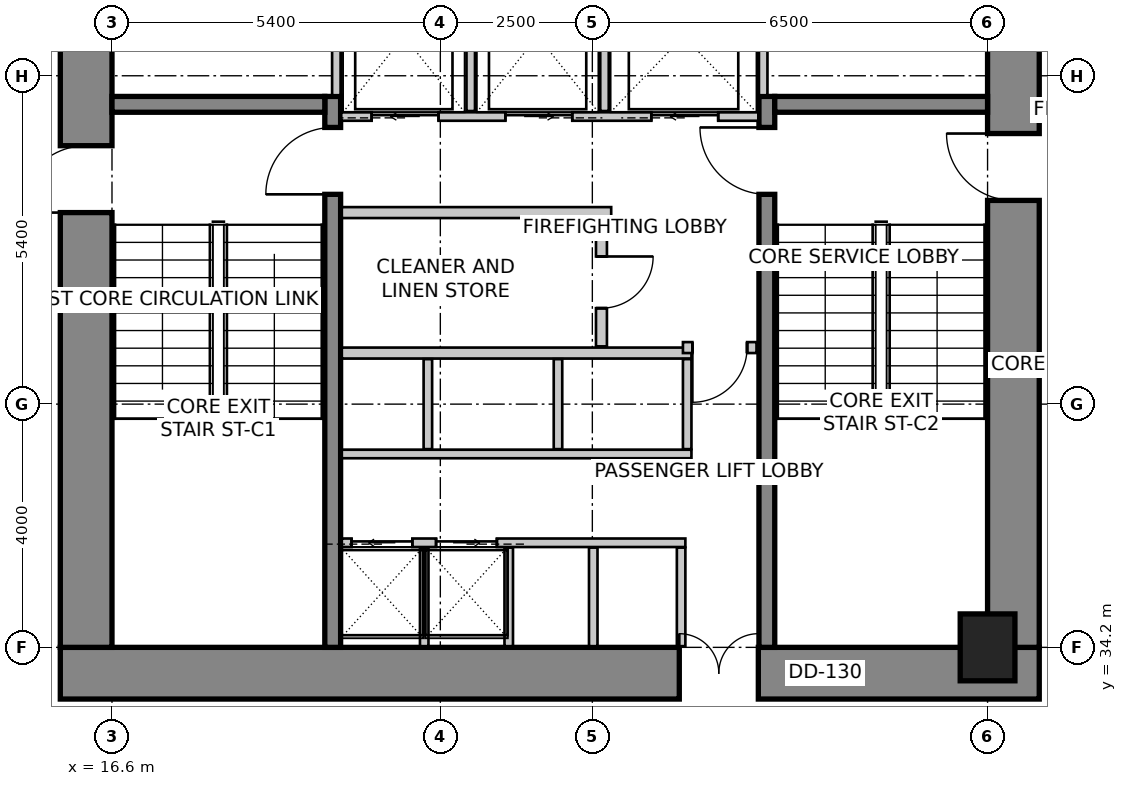
"""IFC4 building model, lengths in metres.
Left out: names, types, materials, properties, quantities, classifications, styles, units other than length and angle.
Written with IfcOpenShell. Run it as: python <this file> out.ifc"""

import sys

from ifc_helpers import new_model, si_unit, direction, frame, frame_2d, origin, origin_2d, place, context, subcontext, project, spatial, rectangle, extrude, source, transform, mapped, element, fill, save


model = new_model("IFC4")
c1 = context("Model", 3, precision=1e-05, world=origin(), true_north=direction((0.0, 1.0)))
c2 = subcontext(c1, "Body", "Model", "MODEL_VIEW")
j1 = project(units=[si_unit("LENGTHUNIT", "METRE"), si_unit("PLANEANGLEUNIT", "RADIAN")], contexts=[c1])
p1 = place(None, origin())
s1 = spatial("IfcSite", under=j1, at=p1, CompositionType="ELEMENT")
p2 = place(p1, origin())
s2 = spatial("IfcBuilding", under=s1, at=p2, CompositionType="ELEMENT")
p3 = place(p2, frame((0.0, 0.0, 91.0)))
s3 = spatial("IfcBuildingStorey", under=s2, at=p3, CompositionType="ELEMENT", Elevation=91.0)
p4 = place(p3, frame((15.75, 33.775, 0.0), z_axis=(0.0, 0.0, 1.0), x_axis=(1.0, 0.0, 0.0)))
e1 = element("IfcWall", 1, at=p4, inside=s3, PredefinedType="SHEAR", context=c2, shape_type="SweptSolid", body=[
    extrude(rectangle(XDim=16.1, YDim=0.85, at=frame_2d((8.05, 0.0))), origin(), (0.0, 0.0, 1.0), 4.0),
])
m1 = source(origin(), c2, "Body", "SweptSolid", [
    extrude(rectangle(XDim=1.3, YDim=2.15, at=frame_2d((0.65, 1.075))), frame((0.0, 0.435, 0.0), z_axis=(0.0, -1.0, 0.0), x_axis=(1.0, 0.0, 0.0)), (0.0, 0.0, 1.0), 0.87),
])
p5 = place(p4, frame((10.18, 0.0, 0.0)))
e2 = element("IfcOpeningElement", 2, at=p5, cuts=e1, PredefinedType="OPENING", context=c2, shape_type="MappedRepresentation", body=[
    mapped(m1, transform((0.0, 0.0, 0.0), scale=1.0)),
])
p6 = place(p3, frame((16.175, 34.2, 0.0), z_axis=(0.0, 0.0, 1.0), x_axis=(0.0, 1.0, 0.0)))
e3 = element("IfcWall", 3, at=p6, inside=s3, PredefinedType="SHEAR", context=c2, shape_type="SweptSolid", body=[
    extrude(rectangle(XDim=11.4, YDim=0.85, at=frame_2d((5.7, 0.0))), origin(), (0.0, 0.0, 1.0), 4.0),
])
m2 = source(origin(), c2, "Body", "SweptSolid", [
    extrude(rectangle(XDim=1.1, YDim=2.15, at=frame_2d((0.55, 1.075))), frame((0.0, 0.435, 0.0), z_axis=(0.0, -1.0, 0.0), x_axis=(1.0, 0.0, 0.0)), (0.0, 0.0, 1.0), 0.87),
])
p7 = place(p6, frame((7.15, 0.0, 0.0)))
e4 = element("IfcOpeningElement", 4, at=p7, cuts=e3, PredefinedType="OPENING", context=c2, shape_type="MappedRepresentation", body=[
    mapped(m2, transform((0.0, 0.0, 0.0), scale=1.0)),
])
p8 = place(p3, frame((31.425, 34.2, 0.0), z_axis=(0.0, 0.0, 1.0), x_axis=(0.0, 1.0, 0.0)))
e5 = element("IfcWall", 5, at=p8, inside=s3, PredefinedType="SHEAR", context=c2, shape_type="SweptSolid", body=[
    extrude(rectangle(XDim=11.4, YDim=0.85, at=frame_2d((5.7, 0.0))), origin(), (0.0, 0.0, 1.0), 4.0),
])
p9 = place(p8, frame((7.35, 0.0, 0.0)))
e6 = element("IfcOpeningElement", 6, at=p9, cuts=e5, PredefinedType="OPENING", context=c2, shape_type="MappedRepresentation", body=[
    mapped(m2, transform((0.0, 0.0, 0.0), scale=1.0)),
])
p10 = place(p3, frame((20.23, 34.2, 0.0), z_axis=(0.0, 0.0, 1.0), x_axis=(0.0, 1.0, 0.0)))
e7 = element("IfcWall", 7, at=p10, inside=s3, PredefinedType="SHEAR", context=c2, shape_type="SweptSolid", body=[
    extrude(rectangle(XDim=9.06, YDim=0.26, at=frame_2d((4.53, 0.0))), origin(), (0.0, 0.0, 1.0), 4.0),
])
m3 = source(origin(), c2, "Body", "SweptSolid", [
    extrude(rectangle(XDim=1.1, YDim=2.15, at=frame_2d((0.55, 1.075))), frame((0.0, 0.14, 0.0), z_axis=(0.0, -1.0, 0.0), x_axis=(1.0, 0.0, 0.0)), (0.0, 0.0, 1.0), 0.28),
])
p11 = place(p10, frame((7.45, 0.0, 0.0)))
e8 = element("IfcOpeningElement", 8, at=p11, cuts=e7, PredefinedType="OPENING", context=c2, shape_type="MappedRepresentation", body=[
    mapped(m3, transform((0.0, 0.0, 0.0), scale=1.0)),
])
p12 = place(p3, frame((27.37, 34.2, 0.0), z_axis=(0.0, 0.0, 1.0), x_axis=(0.0, 1.0, 0.0)))
e9 = element("IfcWall", 9, at=p12, inside=s3, PredefinedType="SHEAR", context=c2, shape_type="SweptSolid", body=[
    extrude(rectangle(XDim=9.06, YDim=0.26, at=frame_2d((4.53, 0.0))), origin(), (0.0, 0.0, 1.0), 4.0),
])
p13 = place(p12, frame((7.45, 0.0, 0.0)))
e10 = element("IfcOpeningElement", 10, at=p13, cuts=e9, PredefinedType="OPENING", context=c2, shape_type="MappedRepresentation", body=[
    mapped(m3, transform((0.0, 0.0, 0.0), scale=1.0)),
])
for number, where, z_axis, x_axis in (
    (11, (16.6, 43.13, 0.0), (0.0, 0.0, 1.0), (1.0, 0.0, 0.0)),
    (12, (27.5, 43.13, 0.0), (0.0, 0.0, 1.0), (1.0, 0.0, 0.0)),
):
    element("IfcWall", number, at=place(p3, frame(where, z_axis=z_axis, x_axis=x_axis)), inside=s3, PredefinedType="SHEAR", context=c2, shape_type="SweptSolid", body=[
        extrude(rectangle(XDim=3.5, YDim=0.26, at=frame_2d((1.75, 0.0))), origin(), (0.0, 0.0, 1.0), 4.0),
    ])
m4 = source(origin(), c2, "Body", "SweptSolid", [
    extrude(rectangle(XDim=0.9, YDim=1.1, at=origin_2d()), origin(), (0.0, 0.0, 1.0), 4.0),
])
p14 = place(p3, frame((31.0, 34.2, 0.0), z_axis=(0.0, 0.0, 1.0), x_axis=(1.0, 0.0, 0.0)))
e13 = element("IfcColumn", 13, at=p14, inside=s3, PredefinedType="COLUMN", context=c2, shape_type="MappedRepresentation", body=[
    mapped(m4, transform((0.0, 0.0, 0.0), scale=1.0)),
])
p15 = place(p3, frame((20.37, 42.93, 0.0), z_axis=(0.0, 0.0, 1.0), x_axis=(1.0, 0.0, 0.0)))
e14 = element("IfcWall", 14, at=p15, inside=s3, PredefinedType="SOLIDWALL", context=c2, shape_type="SweptSolid", body=[
    extrude(rectangle(XDim=6.86, YDim=0.14, at=frame_2d((3.43, 0.0))), origin(), (0.0, 0.0, 1.0), 3.75),
])
m5 = source(origin(), c2, "Body", "SweptSolid", [
    extrude(rectangle(XDim=1.1, YDim=2.15, at=frame_2d((0.55, 1.075))), frame((0.0, 0.08, 0.0), z_axis=(0.0, -1.0, 0.0), x_axis=(1.0, 0.0, 0.0)), (0.0, 0.0, 1.0), 0.16),
])
p16 = place(p15, frame((0.5, 0.0, 0.0)))
e15 = element("IfcOpeningElement", 15, at=p16, cuts=e14, PredefinedType="OPENING", context=c2, shape_type="MappedRepresentation", body=[
    mapped(m5, transform((0.0, 0.0, 0.0), scale=1.0)),
])
p17 = place(p15, frame((2.7, 0.0, 0.0)))
e16 = element("IfcOpeningElement", 16, at=p17, cuts=e14, PredefinedType="OPENING", context=c2, shape_type="MappedRepresentation", body=[
    mapped(m5, transform((0.0, 0.0, 0.0), scale=1.0)),
])
p18 = place(p15, frame((5.1, 0.0, 0.0)))
e17 = element("IfcOpeningElement", 17, at=p18, cuts=e14, PredefinedType="OPENING", context=c2, shape_type="MappedRepresentation", body=[
    mapped(m5, transform((0.0, 0.0, 0.0), scale=1.0)),
])
for number, where, z_axis, x_axis in (
    (18, (20.29, 43.28, 0.0), (0.0, 0.0, 1.0), (0.0, 1.0, 0.0)),
    (19, (27.31, 43.28, 0.0), (0.0, 0.0, 1.0), (0.0, 1.0, 0.0)),
):
    element("IfcWall", number, at=place(p3, frame(where, z_axis=z_axis, x_axis=x_axis)), inside=s3, PredefinedType="SOLIDWALL", context=c2, shape_type="SweptSolid", body=[
        extrude(rectangle(XDim=2.3, YDim=0.14, at=frame_2d((1.15, 0.0))), origin(), (0.0, 0.0, 1.0), 3.75),
    ])
for number, where, z_axis, x_axis in (
    (20, (22.5, 43.02, 0.0), (0.0, 0.0, 1.0), (0.0, 1.0, 0.0)),
    (21, (24.7, 43.02, 0.0), (0.0, 0.0, 1.0), (0.0, 1.0, 0.0)),
):
    element("IfcWall", number, at=place(p3, frame(where, z_axis=z_axis, x_axis=x_axis)), inside=s3, PredefinedType="SOLIDWALL", context=c2, shape_type="SweptSolid", body=[
        extrude(rectangle(XDim=2.56, YDim=0.14, at=frame_2d((1.28, 0.0))), origin(), (0.0, 0.0, 1.0), 3.75),
    ])
p19 = place(p3, frame((20.38, 35.92, 0.0), z_axis=(0.0, 0.0, 1.0), x_axis=(1.0, 0.0, 0.0)))
e22 = element("IfcWall", 22, at=p19, inside=s3, PredefinedType="SOLIDWALL", context=c2, shape_type="SweptSolid", body=[
    extrude(rectangle(XDim=5.65, YDim=0.14, at=frame_2d((2.825, 0.0))), origin(), (0.0, 0.0, 1.0), 3.75),
])
m6 = source(origin(), c2, "Body", "SweptSolid", [
    extrude(rectangle(XDim=1.0, YDim=2.15, at=frame_2d((0.5, 1.075))), frame((0.0, 0.08, 0.0), z_axis=(0.0, -1.0, 0.0), x_axis=(1.0, 0.0, 0.0)), (0.0, 0.0, 1.0), 0.16),
])
p20 = place(p19, frame((0.16, 0.0, 0.0)))
e23 = element("IfcOpeningElement", 23, at=p20, cuts=e22, PredefinedType="OPENING", context=c2, shape_type="MappedRepresentation", body=[
    mapped(m6, transform((0.0, 0.0, 0.0), scale=1.0)),
])
p21 = place(p19, frame((1.55, 0.0, 0.0)))
e24 = element("IfcOpeningElement", 24, at=p21, cuts=e22, PredefinedType="OPENING", context=c2, shape_type="MappedRepresentation", body=[
    mapped(m6, transform((0.0, 0.0, 0.0), scale=1.0)),
])
for number, where, z_axis, x_axis in (
    (25, (25.96, 34.22, 0.0), (0.0, 0.0, 1.0), (0.0, 1.0, 0.0)),
    (26, (21.735, 34.22, 0.0), (0.0, 0.0, 1.0), (0.0, 1.0, 0.0)),
    (27, (23.125, 34.22, 0.0), (0.0, 0.0, 1.0), (0.0, 1.0, 0.0)),
    (28, (24.515, 34.22, 0.0), (0.0, 0.0, 1.0), (0.0, 1.0, 0.0)),
):
    element("IfcWall", number, at=place(p3, frame(where, z_axis=z_axis, x_axis=x_axis)), inside=s3, PredefinedType="SOLIDWALL", context=c2, shape_type="SweptSolid", body=[
        extrude(rectangle(XDim=1.62, YDim=0.14, at=frame_2d((0.81, 0.0))), origin(), (0.0, 0.0, 1.0), 3.042),
    ])
p22 = place(p3, frame((20.38, 37.38, 0.0), z_axis=(0.0, 0.0, 1.0), x_axis=(1.0, 0.0, 0.0)))
e29 = element("IfcWall", 29, at=p22, inside=s3, PredefinedType="SOLIDWALL", context=c2, shape_type="SweptSolid", body=[
    extrude(rectangle(XDim=5.75, YDim=0.14, at=frame_2d((2.875, 0.0))), origin(), (0.0, 0.0, 1.0), 3.75),
])
p23 = place(p3, frame((20.38, 39.04, 0.0), z_axis=(0.0, 0.0, 1.0), x_axis=(1.0, 0.0, 0.0)))
e30 = element("IfcWall", 30, at=p23, inside=s3, PredefinedType="SOLIDWALL", context=c2, shape_type="SweptSolid", body=[
    extrude(rectangle(XDim=5.75, YDim=0.18, at=frame_2d((2.875, 0.0))), origin(), (0.0, 0.0, 1.0), 3.75),
])
for number, where, z_axis, x_axis in (
    (31, (26.06, 37.46, 0.0), (0.0, 0.0, 1.0), (0.0, 1.0, 0.0)),
    (32, (21.795, 37.46, 0.0), (0.0, 0.0, 1.0), (0.0, 1.0, 0.0)),
    (33, (23.935, 37.46, 0.0), (0.0, 0.0, 1.0), (0.0, 1.0, 0.0)),
):
    element("IfcWall", number, at=place(p3, frame(where, z_axis=z_axis, x_axis=x_axis)), inside=s3, PredefinedType="SOLIDWALL", context=c2, shape_type="SweptSolid", body=[
        extrude(rectangle(XDim=1.48, YDim=0.14, at=frame_2d((0.74, 0.0))), origin(), (0.0, 0.0, 1.0), 3.75),
    ])
p24 = place(p3, frame((24.81, 41.35, 0.0), z_axis=(0.0, 0.0, 1.0), x_axis=(-1.0, 0.0, 0.0)))
e34 = element("IfcWall", 34, at=p24, inside=s3, PredefinedType="PARTITIONING", context=c2, shape_type="SweptSolid", body=[
    extrude(rectangle(XDim=4.43, YDim=0.18, at=frame_2d((2.215, 0.0))), origin(), (0.0, 0.0, 1.0), 3.75),
])
p25 = place(p3, frame((24.65, 41.256, 0.0), z_axis=(0.0, 0.0, 1.0), x_axis=(0.0, -1.0, 0.0)))
e35 = element("IfcWall", 35, at=p25, inside=s3, PredefinedType="PARTITIONING", context=c2, shape_type="SweptSolid", body=[
    extrude(rectangle(XDim=2.106, YDim=0.18, at=frame_2d((1.053, 0.0))), origin(), (0.0, 0.0, 1.0), 3.75),
])
m7 = source(origin(), c2, "Body", "SweptSolid", [
    extrude(rectangle(XDim=0.85, YDim=2.15, at=frame_2d((0.425, 1.075))), frame((0.0, 0.1, 0.0), z_axis=(0.0, -1.0, 0.0), x_axis=(1.0, 0.0, 0.0)), (0.0, 0.0, 1.0), 0.2),
])
p26 = place(p25, frame((0.628, 0.0, 0.0)))
e36 = element("IfcOpeningElement", 36, at=p26, cuts=e35, PredefinedType="OPENING", context=c2, shape_type="MappedRepresentation", body=[
    mapped(m7, transform((0.0, 0.0, 0.0), scale=1.0)),
])
p27 = place(p3, frame((27.2, 39.13, 0.0), z_axis=(0.0, 0.0, 1.0), x_axis=(-1.0, 0.0, 0.0)))
e37 = element("IfcWall", 37, at=p27, inside=s3, PredefinedType="PARTITIONING", context=c2, shape_type="SweptSolid", body=[
    extrude(rectangle(XDim=1.21, YDim=0.18, at=frame_2d((0.605, 0.0))), origin(), (0.0, 0.0, 1.0), 3.75),
])
m8 = source(origin(), c2, "Body", "SweptSolid", [
    extrude(rectangle(XDim=0.9, YDim=2.15, at=frame_2d((0.45, 1.075))), frame((0.0, 0.1, 0.0), z_axis=(0.0, -1.0, 0.0), x_axis=(1.0, 0.0, 0.0)), (0.0, 0.0, 1.0), 0.2),
])
p28 = place(p27, frame((0.155, 0.0, 0.0)))
e38 = element("IfcOpeningElement", 38, at=p28, cuts=e37, PredefinedType="OPENING", context=c2, shape_type="MappedRepresentation", body=[
    mapped(m8, transform((0.0, 0.0, 0.0), scale=1.0)),
])
m9 = source(origin(), c2, "Body", "SweptSolid", [
    extrude(rectangle(XDim=1.1, YDim=2.15, at=frame_2d((0.55, 1.075))), frame((0.0, 0.025, 0.0), z_axis=(0.0, -1.0, 0.0), x_axis=(1.0, 0.0, 0.0)), (0.0, 0.0, 1.0), 0.05),
])
p29 = place(p16, origin())
e39 = element("IfcDoor", 39, at=p29, inside=s3, OperationType="SLIDING_TO_LEFT", PredefinedType="DOOR", context=c2, shape_type="MappedRepresentation", body=[
    mapped(m9, transform((0.0, 0.0, 0.0), scale=1.0)),
])
fill(e15, e39)
p30 = place(p17, origin())
e40 = element("IfcDoor", 40, at=p30, inside=s3, OperationType="SLIDING_TO_RIGHT", PredefinedType="DOOR", context=c2, shape_type="MappedRepresentation", body=[
    mapped(m9, transform((0.0, 0.0, 0.0), scale=1.0)),
])
fill(e16, e40)
m10 = source(origin(), c2, "Body", "SweptSolid", [
    extrude(rectangle(XDim=1.1, YDim=2.15, at=frame_2d((0.55, 1.075))), frame((0.0, 0.025, 0.0), z_axis=(0.0, -1.0, 0.0), x_axis=(1.0, 0.0, 0.0)), (0.0, 0.0, 1.0), 0.05),
])
p31 = place(p18, origin())
e41 = element("IfcDoor", 41, at=p31, inside=s3, OperationType="SLIDING_TO_LEFT", PredefinedType="DOOR", context=c2, shape_type="MappedRepresentation", body=[
    mapped(m10, transform((0.0, 0.0, 0.0), scale=1.0)),
])
fill(e17, e41)
m11 = source(origin(), c2, "Body", "SweptSolid", [
    extrude(rectangle(XDim=1.0, YDim=2.15, at=frame_2d((0.5, 1.075))), frame((0.0, 0.025, 0.0), z_axis=(0.0, -1.0, 0.0), x_axis=(1.0, 0.0, 0.0)), (0.0, 0.0, 1.0), 0.05),
])
p32 = place(p20, origin())
e42 = element("IfcDoor", 42, at=p32, inside=s3, OperationType="SLIDING_TO_LEFT", PredefinedType="DOOR", context=c2, shape_type="MappedRepresentation", body=[
    mapped(m11, transform((0.0, 0.0, 0.0), scale=1.0)),
])
fill(e23, e42)
p33 = place(p21, origin())
e43 = element("IfcDoor", 43, at=p33, inside=s3, OperationType="SLIDING_TO_RIGHT", PredefinedType="DOOR", context=c2, shape_type="MappedRepresentation", body=[
    mapped(m11, transform((0.0, 0.0, 0.0), scale=1.0)),
])
fill(e24, e43)
m12 = source(origin(), c2, "Body", "SweptSolid", [
    extrude(rectangle(XDim=1.1, YDim=2.15, at=frame_2d((0.55, 1.075))), frame((0.0, 0.025, 0.0), z_axis=(0.0, -1.0, 0.0), x_axis=(1.0, 0.0, 0.0)), (0.0, 0.0, 1.0), 0.05),
])
p34 = place(p11, origin())
e44 = element("IfcDoor", 44, at=p34, inside=s3, OperationType="SINGLE_SWING_LEFT", PredefinedType="DOOR", context=c2, shape_type="MappedRepresentation", body=[
    mapped(m12, transform((0.0, 0.0, 0.0), scale=1.0)),
])
fill(e8, e44)
p35 = place(p13, origin())
e45 = element("IfcDoor", 45, at=p35, inside=s3, OperationType="SINGLE_SWING_RIGHT", PredefinedType="DOOR", context=c2, shape_type="MappedRepresentation", body=[
    mapped(m12, transform((0.0, 0.0, 0.0), scale=1.0)),
])
fill(e10, e45)
p36 = place(p7, origin())
e46 = element("IfcDoor", 46, at=p36, inside=s3, OperationType="SINGLE_SWING_LEFT", PredefinedType="DOOR", context=c2, shape_type="MappedRepresentation", body=[
    mapped(m12, transform((0.0, 0.0, 0.0), scale=1.0)),
])
fill(e4, e46)
p37 = place(p9, origin())
e47 = element("IfcDoor", 47, at=p37, inside=s3, OperationType="SINGLE_SWING_RIGHT", PredefinedType="DOOR", context=c2, shape_type="MappedRepresentation", body=[
    mapped(m12, transform((0.0, 0.0, 0.0), scale=1.0)),
])
fill(e6, e47)
m13 = source(origin(), c2, "Body", "SweptSolid", [
    extrude(rectangle(XDim=1.3, YDim=2.15, at=frame_2d((0.65, 1.075))), frame((0.0, 0.025, 0.0), z_axis=(0.0, -1.0, 0.0), x_axis=(1.0, 0.0, 0.0)), (0.0, 0.0, 1.0), 0.05),
])
p38 = place(p5, origin())
e48 = element("IfcDoor", 48, at=p38, inside=s3, OperationType="DOUBLE_DOOR_SINGLE_SWING", PredefinedType="DOOR", context=c2, shape_type="MappedRepresentation", body=[
    mapped(m13, transform((0.0, 0.0, 0.0), scale=1.0)),
])
fill(e2, e48)
m14 = source(origin(), c2, "Body", "SweptSolid", [
    extrude(rectangle(XDim=0.85, YDim=2.15, at=frame_2d((0.425, 1.075))), frame((0.0, 0.025, 0.0), z_axis=(0.0, -1.0, 0.0), x_axis=(1.0, 0.0, 0.0)), (0.0, 0.0, 1.0), 0.05),
])
p39 = place(p26, origin())
e49 = element("IfcDoor", 49, at=p39, inside=s3, OperationType="SINGLE_SWING_LEFT", PredefinedType="DOOR", context=c2, shape_type="MappedRepresentation", body=[
    mapped(m14, transform((0.0, 0.0, 0.0), scale=1.0)),
])
fill(e36, e49)
m15 = source(origin(), c2, "Body", "SweptSolid", [
    extrude(rectangle(XDim=0.9, YDim=2.15, at=frame_2d((0.45, 1.075))), frame((0.0, 0.025, 0.0), z_axis=(0.0, -1.0, 0.0), x_axis=(1.0, 0.0, 0.0)), (0.0, 0.0, 1.0), 0.05),
])
p40 = place(p28, origin())
e50 = element("IfcDoor", 50, at=p40, inside=s3, OperationType="SINGLE_SWING_RIGHT", PredefinedType="DOOR", context=c2, shape_type="MappedRepresentation", body=[
    mapped(m15, transform((0.0, 0.0, 0.0), scale=1.0)),
])
fill(e38, e50)
save(model, sys.argv[1])
